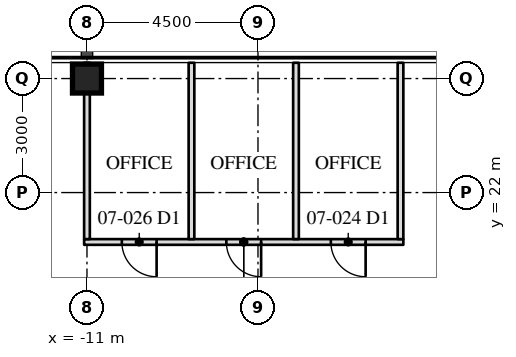
"""IFC4 building model, lengths in metres.
Left out: names, types, materials, properties, quantities, classifications, styles, units other than length and angle.
Written with IfcOpenShell. Run it as: python <this file> out.ifc"""

import sys

from ifc_helpers import new_model, si_unit, direction, frame, frame_2d, origin, origin_2d, place, context, subcontext, project, spatial, rectangle, hollow_rectangle, extrude, element, fill, save


model = new_model("IFC4")
c1 = context("Model", 3, precision=1e-05, world=origin(), true_north=direction((0.0, 1.0)))
c2 = subcontext(c1, "Body", "Model", "MODEL_VIEW")
j1 = project(units=[si_unit("LENGTHUNIT", "METRE"), si_unit("PLANEANGLEUNIT", "RADIAN")], contexts=[c1])
p1 = place(None, origin())
s1 = spatial("IfcSite", under=j1, at=p1, CompositionType="ELEMENT")
p2 = place(p1, origin())
s2 = spatial("IfcBuilding", under=s1, at=p2, CompositionType="ELEMENT")
p3 = place(p2, frame((0.0, 0.0, 32.4)))
s3 = spatial("IfcBuildingStorey", under=s2, at=p3, CompositionType="ELEMENT", Elevation=32.4)
p4 = place(p3, frame((-11.0, 25.0, 0.0), z_axis=(0.0, 0.0, 1.0), x_axis=(1.0, 0.0, 0.0)))
e1 = element("IfcColumn", 1, at=p4, inside=s3, PredefinedType="COLUMN", context=c2, shape_type="SweptSolid", body=[
    extrude(hollow_rectangle(XDim=0.762, YDim=0.762, WallThickness=0.127, at=origin_2d()), origin(), (0.0, 0.0, 1.0), 4.1),
])
p5 = place(p3, frame((-2.675, 20.7, 0.0), z_axis=(0.0, 0.0, 1.0), x_axis=(-1.0, 0.0, 0.0)))
e2 = element("IfcWall", 2, at=p5, inside=s3, PredefinedType="PARTITIONING", context=c2, shape_type="SweptSolid", body=[
    extrude(rectangle(XDim=8.4, YDim=0.15, at=frame_2d((4.2, 0.0))), origin(), (0.0, 0.0, 1.0), 3.91),
])
p6 = place(p5, frame((0.992, 0.0, 0.0)))
e3 = element("IfcOpeningElement", 3, at=p6, cuts=e2, PredefinedType="OPENING", context=c2, shape_type="SweptSolid", body=[
    extrude(rectangle(XDim=0.915, YDim=2.134, at=frame_2d((0.458, 1.067))), frame((0.0, 0.085, 0.0), z_axis=(0.0, -1.0, 0.0), x_axis=(1.0, 0.0, 0.0)), (0.0, 0.0, 1.0), 0.17),
])
p7 = place(p5, frame((3.742, 0.0, 0.0)))
e4 = element("IfcOpeningElement", 4, at=p7, cuts=e2, PredefinedType="OPENING", context=c2, shape_type="SweptSolid", body=[
    extrude(rectangle(XDim=0.915, YDim=2.134, at=frame_2d((0.458, 1.067))), frame((0.0, 0.085, 0.0), z_axis=(0.0, -1.0, 0.0), x_axis=(1.0, 0.0, 0.0)), (0.0, 0.0, 1.0), 0.17),
])
p8 = place(p5, frame((6.492, 0.0, 0.0)))
e5 = element("IfcOpeningElement", 5, at=p8, cuts=e2, PredefinedType="OPENING", context=c2, shape_type="SweptSolid", body=[
    extrude(rectangle(XDim=0.915, YDim=2.134, at=frame_2d((0.458, 1.067))), frame((0.0, 0.085, 0.0), z_axis=(0.0, -1.0, 0.0), x_axis=(1.0, 0.0, 0.0)), (0.0, 0.0, 1.0), 0.17),
])
for number, where, z_axis, x_axis in (
    (6, (-2.75, 20.775, 0.0), (0.0, 0.0, 1.0), (0.0, 1.0, 0.0)),
    (7, (-5.5, 20.775, 0.0), (0.0, 0.0, 1.0), (0.0, 1.0, 0.0)),
    (8, (-8.25, 20.775, 0.0), (0.0, 0.0, 1.0), (0.0, 1.0, 0.0)),
):
    element("IfcWall", number, at=place(p3, frame(where, z_axis=z_axis, x_axis=x_axis)), inside=s3, PredefinedType="PARTITIONING", context=c2, shape_type="SweptSolid", body=[
        extrude(rectangle(XDim=4.64, YDim=0.15, at=frame_2d((2.32, 0.0))), origin(), (0.0, 0.0, 1.0), 3.91),
    ])
p9 = place(p3, frame((-11.0, 20.775, 0.0), z_axis=(0.0, 0.0, 1.0), x_axis=(0.0, 1.0, 0.0)))
e9 = element("IfcWall", 9, at=p9, inside=s3, PredefinedType="PARTITIONING", context=c2, shape_type="SweptSolid", body=[
    extrude(rectangle(XDim=4.64, YDim=0.15, at=frame_2d((2.32, 0.0))), origin(), (0.0, 0.0, 1.0), 3.13),
])
p10 = place(p6, origin())
e10 = element("IfcDoor", 10, at=p10, inside=s3, OperationType="SINGLE_SWING_LEFT", PredefinedType="DOOR", context=c2, shape_type="SweptSolid", body=[
    extrude(rectangle(XDim=0.915, YDim=2.134, at=frame_2d((0.458, 1.067))), frame((0.0, 0.025, 0.0), z_axis=(0.0, -1.0, 0.0), x_axis=(1.0, 0.0, 0.0)), (0.0, 0.0, 1.0), 0.05),
])
fill(e3, e10)
p11 = place(p7, origin())
e11 = element("IfcDoor", 11, at=p11, inside=s3, OperationType="SINGLE_SWING_LEFT", PredefinedType="DOOR", context=c2, shape_type="SweptSolid", body=[
    extrude(rectangle(XDim=0.915, YDim=2.134, at=frame_2d((0.458, 1.067))), frame((0.0, 0.025, 0.0), z_axis=(0.0, -1.0, 0.0), x_axis=(1.0, 0.0, 0.0)), (0.0, 0.0, 1.0), 0.05),
])
fill(e4, e11)
p12 = place(p8, origin())
e12 = element("IfcDoor", 12, at=p12, inside=s3, OperationType="SINGLE_SWING_LEFT", PredefinedType="DOOR", context=c2, shape_type="SweptSolid", body=[
    extrude(rectangle(XDim=0.915, YDim=2.134, at=frame_2d((0.458, 1.067))), frame((0.0, 0.025, 0.0), z_axis=(0.0, -1.0, 0.0), x_axis=(1.0, 0.0, 0.0)), (0.0, 0.0, 1.0), 0.05),
])
fill(e5, e12)
save(model, sys.argv[1])
